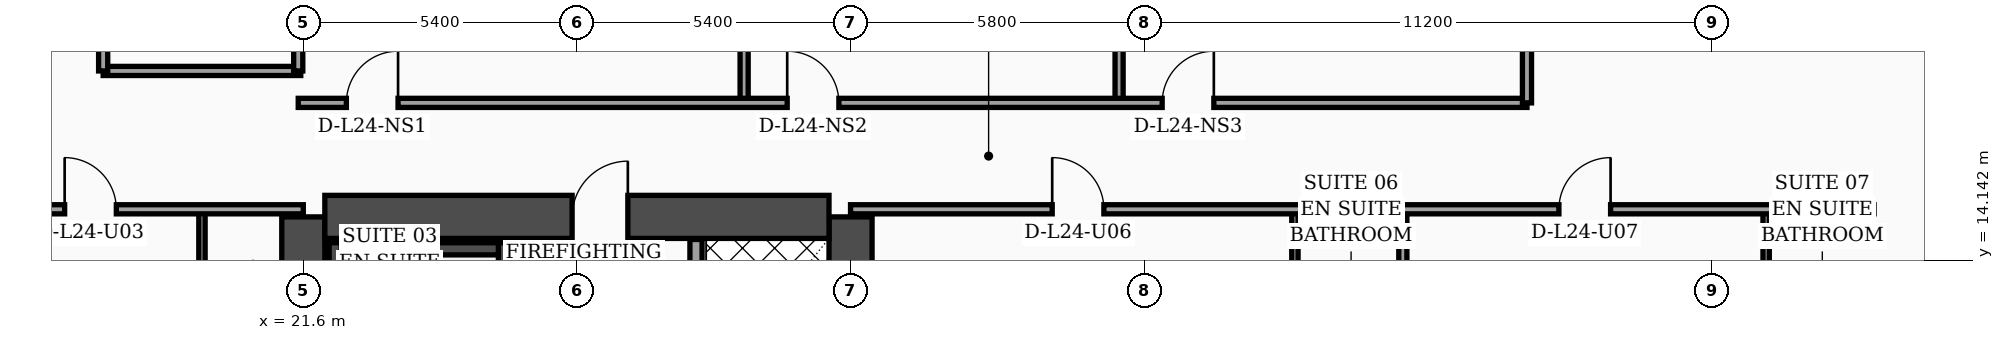
"""IFC4 building model, lengths in metres.
Left out: names, types, materials, properties, quantities, classifications, styles, units other than length and angle.
Written with IfcOpenShell. Run it as: python <this file> out.ifc"""

import sys

from ifc_helpers import new_model, si_unit, direction, frame, frame_2d, origin, place, context, subcontext, project, spatial, rectangle, extrude, element, fill, save


model = new_model("IFC4")
c1 = context("Model", 3, precision=1e-05, world=origin(), true_north=direction((0.0, 1.0)))
c2 = subcontext(c1, "Body", "Model", "MODEL_VIEW")
j1 = project(units=[si_unit("LENGTHUNIT", "METRE"), si_unit("PLANEANGLEUNIT", "RADIAN")], contexts=[c1])
p1 = place(None, origin())
s1 = spatial("IfcSite", under=j1, at=p1, CompositionType="ELEMENT")
p2 = place(p1, origin())
s2 = spatial("IfcBuilding", under=s1, at=p2, CompositionType="ELEMENT")
p3 = place(p2, frame((0.0, 0.0, 101.2)))
s3 = spatial("IfcBuildingStorey", under=s2, at=p3, CompositionType="ELEMENT", Elevation=101.2)
for number, where, z_axis, x_axis in (
    (1, (21.6, 4.6, 0.0), (0.0, 0.0, 1.0), (0.0, 1.0, 0.0)),
    (2, (32.4, 4.6, 0.0), (0.0, 0.0, 1.0), (0.0, 1.0, 0.0)),
):
    element("IfcWall", number, at=place(p3, frame(where, z_axis=z_axis, x_axis=x_axis)), inside=s3, PredefinedType="SHEAR", context=c2, shape_type="SweptSolid", body=[
        extrude(rectangle(XDim=10.4, YDim=0.85, at=frame_2d((5.2, 0.0))), origin(), (0.0, 0.0, 1.0), 3.56),
    ])
p4 = place(p3, frame((22.025, 15.0, 0.0), z_axis=(0.0, 0.0, 1.0), x_axis=(1.0, 0.0, 0.0)))
e3 = element("IfcWall", 3, at=p4, inside=s3, PredefinedType="SHEAR", context=c2, shape_type="SweptSolid", body=[
    extrude(rectangle(XDim=9.95, YDim=0.85, at=frame_2d((4.975, 0.0))), origin(), (0.0, 0.0, 1.0), 3.56),
])
p5 = place(p4, frame((4.88, 0.0, 0.0)))
e4 = element("IfcOpeningElement", 4, at=p5, cuts=e3, PredefinedType="OPENING", context=c2, shape_type="SweptSolid", body=[
    extrude(rectangle(XDim=1.1, YDim=2.2, at=frame_2d((0.55, 1.1))), frame((0.0, 0.435, 0.0), z_axis=(0.0, -1.0, 0.0), x_axis=(1.0, 0.0, 0.0)), (0.0, 0.0, 1.0), 0.87),
])
p6 = place(p3, frame((22.23, 5.025, 0.0), z_axis=(0.0, 0.0, 1.0), x_axis=(0.0, 1.0, 0.0)))
e5 = element("IfcWall", 5, at=p6, inside=s3, PredefinedType="SOLIDWALL", context=c2, shape_type="SweptSolid", body=[
    extrude(rectangle(XDim=9.465, YDim=0.24, at=frame_2d((4.732, 0.0))), origin(), (0.0, 0.0, 1.0), 3.56),
])
p7 = place(p3, frame((25.57, 5.025, 0.0), z_axis=(0.0, 0.0, 1.0), x_axis=(0.0, 1.0, 0.0)))
e6 = element("IfcWall", 6, at=p7, inside=s3, PredefinedType="SOLIDWALL", context=c2, shape_type="SweptSolid", body=[
    extrude(rectangle(XDim=9.465, YDim=0.24, at=frame_2d((4.732, 0.0))), origin(), (0.0, 0.0, 1.0), 3.56),
])
p8 = place(p7, frame((0.35, 0.0, 0.0)))
e7 = element("IfcOpeningElement", 7, at=p8, cuts=e6, PredefinedType="OPENING", context=c2, shape_type="SweptSolid", body=[
    extrude(rectangle(XDim=1.15, YDim=2.2, at=frame_2d((0.575, 1.1))), frame((0.0, 0.13, 0.0), z_axis=(0.0, -1.0, 0.0), x_axis=(1.0, 0.0, 0.0)), (0.0, 0.0, 1.0), 0.26),
])
p9 = place(p3, frame((22.35, 14.37, 0.0), z_axis=(0.0, 0.0, 1.0), x_axis=(1.0, 0.0, 0.0)))
e8 = element("IfcWall", 8, at=p9, inside=s3, PredefinedType="SOLIDWALL", context=c2, shape_type="SweptSolid", body=[
    extrude(rectangle(XDim=3.1, YDim=0.24, at=frame_2d((1.55, 0.0))), origin(), (0.0, 0.0, 1.0), 3.56),
])
p10 = place(p3, frame((59.23, 5.505, 0.0), z_axis=(0.0, 0.0, 1.0), x_axis=(-0.300509063924, 0.953778958931, 0.0)))
e9 = element("IfcWall", 9, at=p10, inside=s3, PredefinedType="SOLIDWALL", context=c2, shape_type="SweptSolid", body=[
    extrude(rectangle(XDim=30.814, YDim=0.32, at=frame_2d((15.407, 0.0))), origin(), (0.0, 0.0, 1.0), 3.56),
])
p11 = place(p10, frame((4.747, 0.0, 0.0)))
e10 = element("IfcOpeningElement", 10, at=p11, cuts=e9, PredefinedType="OPENING", context=c2, shape_type="SweptSolid", body=[
    extrude(rectangle(XDim=1.4, YDim=2.25, at=frame_2d((0.7, 1.125))), frame((0.0, 0.17, 0.0), z_axis=(0.0, -1.0, 0.0), x_axis=(1.0, 0.0, 0.0)), (0.0, 0.0, 1.0), 0.34),
])
p12 = place(p10, frame((1.6, 0.0, 0.75)))
e11 = element("IfcOpeningElement", 11, at=p12, cuts=e9, PredefinedType="OPENING", context=c2, shape_type="SweptSolid", body=[
    extrude(rectangle(XDim=1.5, YDim=1.6, at=frame_2d((0.75, 0.8))), frame((0.0, 0.17, 0.0), z_axis=(0.0, -1.0, 0.0), x_axis=(1.0, 0.0, 0.0)), (0.0, 0.0, 1.0), 0.34),
])
p13 = place(p10, frame((7.8, 0.0, 0.75)))
e12 = element("IfcOpeningElement", 12, at=p13, cuts=e9, PredefinedType="OPENING", context=c2, shape_type="SweptSolid", body=[
    extrude(rectangle(XDim=1.5, YDim=1.6, at=frame_2d((0.75, 0.8))), frame((0.0, 0.17, 0.0), z_axis=(0.0, -1.0, 0.0), x_axis=(1.0, 0.0, 0.0)), (0.0, 0.0, 1.0), 0.34),
])
p14 = place(p10, frame((10.9, 0.0, 0.75)))
e13 = element("IfcOpeningElement", 13, at=p14, cuts=e9, PredefinedType="OPENING", context=c2, shape_type="SweptSolid", body=[
    extrude(rectangle(XDim=1.5, YDim=1.6, at=frame_2d((0.75, 0.8))), frame((0.0, 0.17, 0.0), z_axis=(0.0, -1.0, 0.0), x_axis=(1.0, 0.0, 0.0)), (0.0, 0.0, 1.0), 0.34),
])
p15 = place(p10, frame((14.0, 0.0, 0.75)))
e14 = element("IfcOpeningElement", 14, at=p15, cuts=e9, PredefinedType="OPENING", context=c2, shape_type="SweptSolid", body=[
    extrude(rectangle(XDim=1.5, YDim=1.6, at=frame_2d((0.75, 0.8))), frame((0.0, 0.17, 0.0), z_axis=(0.0, -1.0, 0.0), x_axis=(1.0, 0.0, 0.0)), (0.0, 0.0, 1.0), 0.34),
])
p16 = place(p10, frame((17.1, 0.0, 0.75)))
e15 = element("IfcOpeningElement", 15, at=p16, cuts=e9, PredefinedType="OPENING", context=c2, shape_type="SweptSolid", body=[
    extrude(rectangle(XDim=1.5, YDim=1.6, at=frame_2d((0.75, 0.8))), frame((0.0, 0.17, 0.0), z_axis=(0.0, -1.0, 0.0), x_axis=(1.0, 0.0, 0.0)), (0.0, 0.0, 1.0), 0.34),
])
p17 = place(p10, frame((20.2, 0.0, 0.75)))
e16 = element("IfcOpeningElement", 16, at=p17, cuts=e9, PredefinedType="OPENING", context=c2, shape_type="SweptSolid", body=[
    extrude(rectangle(XDim=1.5, YDim=1.6, at=frame_2d((0.75, 0.8))), frame((0.0, 0.17, 0.0), z_axis=(0.0, -1.0, 0.0), x_axis=(1.0, 0.0, 0.0)), (0.0, 0.0, 1.0), 0.34),
])
p18 = place(p10, frame((23.3, 0.0, 0.75)))
e17 = element("IfcOpeningElement", 17, at=p18, cuts=e9, PredefinedType="OPENING", context=c2, shape_type="SweptSolid", body=[
    extrude(rectangle(XDim=1.5, YDim=1.6, at=frame_2d((0.75, 0.8))), frame((0.0, 0.17, 0.0), z_axis=(0.0, -1.0, 0.0), x_axis=(1.0, 0.0, 0.0)), (0.0, 0.0, 1.0), 0.34),
])
p19 = place(p10, frame((26.4, 0.0, 0.75)))
e18 = element("IfcOpeningElement", 18, at=p19, cuts=e9, PredefinedType="OPENING", context=c2, shape_type="SweptSolid", body=[
    extrude(rectangle(XDim=1.5, YDim=1.6, at=frame_2d((0.75, 0.8))), frame((0.0, 0.17, 0.0), z_axis=(0.0, -1.0, 0.0), x_axis=(1.0, 0.0, 0.0)), (0.0, 0.0, 1.0), 0.34),
])
p20 = place(p3, frame((29.35, 5.045, 0.0), z_axis=(0.0, 0.0, 1.0), x_axis=(0.0, 1.0, 0.0)))
e19 = element("IfcWall", 19, at=p20, inside=s3, PredefinedType="SOLIDWALL", context=c2, shape_type="SweptSolid", body=[
    extrude(rectangle(XDim=9.51, YDim=0.24, at=frame_2d((4.755, 0.0))), origin(), (0.0, 0.0, 1.0), 3.56),
])
p21 = place(p20, frame((0.55, 0.0, 0.0)))
e20 = element("IfcOpeningElement", 20, at=p21, cuts=e19, PredefinedType="OPENING", context=c2, shape_type="SweptSolid", body=[
    extrude(rectangle(XDim=1.3, YDim=2.35, at=frame_2d((0.65, 1.175))), frame((0.0, 0.13, 0.0), z_axis=(0.0, -1.0, 0.0), x_axis=(1.0, 0.0, 0.0)), (0.0, 0.0, 1.0), 0.26),
])
p22 = place(p3, frame((19.6, 2.44, 0.0), z_axis=(0.0, 0.0, 1.0), x_axis=(0.0, 1.0, 0.0)))
e21 = element("IfcWall", 21, at=p22, inside=s3, PredefinedType="PARTITIONING", context=c2, shape_type="SweptSolid", body=[
    extrude(rectangle(XDim=12.71, YDim=0.125, at=frame_2d((6.355, 0.0))), origin(), (0.0, 0.0, 1.0), 2.49),
])
p23 = place(p22, frame((4.34, 0.0, 0.0)))
e22 = element("IfcOpeningElement", 22, at=p23, cuts=e21, PredefinedType="OPENING", context=c2, shape_type="SweptSolid", body=[
    extrude(rectangle(XDim=0.96, YDim=2.2, at=frame_2d((0.48, 1.1))), frame((0.0, 0.073, 0.0), z_axis=(0.0, -1.0, 0.0), x_axis=(1.0, 0.0, 0.0)), (0.0, 0.0, 1.0), 0.145),
])
p24 = place(p22, frame((10.18, 0.0, 0.0)))
e23 = element("IfcOpeningElement", 23, at=p24, cuts=e21, PredefinedType="OPENING", context=c2, shape_type="SweptSolid", body=[
    extrude(rectangle(XDim=0.9, YDim=2.15, at=frame_2d((0.45, 1.075))), frame((0.0, 0.073, 0.0), z_axis=(0.0, -1.0, 0.0), x_axis=(1.0, 0.0, 0.0)), (0.0, 0.0, 1.0), 0.145),
])
p25 = place(p3, frame((15.15, 15.15, 0.0), z_axis=(0.0, 0.0, 1.0), x_axis=(1.0, 0.0, 0.0)))
e24 = element("IfcWall", 24, at=p25, inside=s3, PredefinedType="PARTITIONING", context=c2, shape_type="SweptSolid", body=[
    extrude(rectangle(XDim=6.45, YDim=0.18, at=frame_2d((3.225, 0.0))), origin(), (0.0, 0.0, 1.0), 2.49),
])
p26 = place(p25, frame((1.74, 0.0, 0.0)))
e25 = element("IfcOpeningElement", 25, at=p26, cuts=e24, PredefinedType="OPENING", context=c2, shape_type="SweptSolid", body=[
    extrude(rectangle(XDim=1.02, YDim=2.2, at=frame_2d((0.51, 1.1))), frame((0.0, 0.1, 0.0), z_axis=(0.0, -1.0, 0.0), x_axis=(1.0, 0.0, 0.0)), (0.0, 0.0, 1.0), 0.2),
])
p27 = place(p3, frame((17.65, 17.88, 0.0), z_axis=(0.0, 0.0, 1.0), x_axis=(1.0, 0.0, 0.0)))
e26 = element("IfcWall", 26, at=p27, inside=s3, PredefinedType="PARTITIONING", context=c2, shape_type="SweptSolid", body=[
    extrude(rectangle(XDim=3.9, YDim=0.18, at=frame_2d((1.95, 0.0))), origin(), (0.0, 0.0, 1.0), 3.09),
])
p28 = place(p3, frame((21.5, 17.88, 0.0), z_axis=(0.0, 0.0, 1.0), x_axis=(0.0, 1.0, 0.0)))
e27 = element("IfcWall", 27, at=p28, inside=s3, PredefinedType="PARTITIONING", context=c2, shape_type="SweptSolid", body=[
    extrude(rectangle(XDim=6.44, YDim=0.18, at=frame_2d((3.22, 0.0))), origin(), (0.0, 0.0, 1.0), 3.09),
])
p29 = place(p3, frame((17.65, 17.88, 0.0), z_axis=(0.0, 0.0, 1.0), x_axis=(0.0, 1.0, 0.0)))
e28 = element("IfcWall", 28, at=p29, inside=s3, PredefinedType="PARTITIONING", context=c2, shape_type="SweptSolid", body=[
    extrude(rectangle(XDim=6.44, YDim=0.18, at=frame_2d((3.22, 0.0))), origin(), (0.0, 0.0, 1.0), 3.09),
])
p30 = place(p29, frame((0.65, 0.0, 0.0)))
e29 = element("IfcOpeningElement", 29, at=p30, cuts=e28, PredefinedType="OPENING", context=c2, shape_type="SweptSolid", body=[
    extrude(rectangle(XDim=0.98, YDim=2.15, at=frame_2d((0.49, 1.075))), frame((0.0, 0.1, 0.0), z_axis=(0.0, -1.0, 0.0), x_axis=(1.0, 0.0, 0.0)), (0.0, 0.0, 1.0), 0.2),
])
p31 = place(p29, frame((3.97, 0.0, 0.0)))
e30 = element("IfcOpeningElement", 30, at=p31, cuts=e28, PredefinedType="OPENING", context=c2, shape_type="SweptSolid", body=[
    extrude(rectangle(XDim=0.96, YDim=2.2, at=frame_2d((0.48, 1.1))), frame((0.0, 0.1, 0.0), z_axis=(0.0, -1.0, 0.0), x_axis=(1.0, 0.0, 0.0)), (0.0, 0.0, 1.0), 0.2),
])
p32 = place(p3, frame((41.17, 2.44, 0.0), z_axis=(0.0, 0.0, 1.0), x_axis=(0.0, 1.0, 0.0)))
e31 = element("IfcWall", 31, at=p32, inside=s3, PredefinedType="PARTITIONING", context=c2, shape_type="SweptSolid", body=[
    extrude(rectangle(XDim=12.71, YDim=0.125, at=frame_2d((6.355, 0.0))), origin(), (0.0, 0.0, 1.0), 3.04),
])
p33 = place(p32, frame((4.35, 0.0, 0.0)))
e32 = element("IfcOpeningElement", 32, at=p33, cuts=e31, PredefinedType="OPENING", context=c2, shape_type="SweptSolid", body=[
    extrude(rectangle(XDim=0.96, YDim=2.2, at=frame_2d((0.48, 1.1))), frame((0.0, 0.073, 0.0), z_axis=(0.0, -1.0, 0.0), x_axis=(1.0, 0.0, 0.0)), (0.0, 0.0, 1.0), 0.145),
])
p34 = place(p32, frame((10.21, 0.0, 0.0)))
e33 = element("IfcOpeningElement", 33, at=p34, cuts=e31, PredefinedType="OPENING", context=c2, shape_type="SweptSolid", body=[
    extrude(rectangle(XDim=0.9, YDim=2.15, at=frame_2d((0.45, 1.075))), frame((0.0, 0.073, 0.0), z_axis=(0.0, -1.0, 0.0), x_axis=(1.0, 0.0, 0.0)), (0.0, 0.0, 1.0), 0.145),
])
p35 = place(p3, frame((50.47, 2.44, 0.0), z_axis=(0.0, 0.0, 1.0), x_axis=(0.0, 1.0, 0.0)))
e34 = element("IfcWall", 34, at=p35, inside=s3, PredefinedType="PARTITIONING", context=c2, shape_type="SweptSolid", body=[
    extrude(rectangle(XDim=12.71, YDim=0.125, at=frame_2d((6.355, 0.0))), origin(), (0.0, 0.0, 1.0), 3.04),
])
p36 = place(p35, frame((4.35, 0.0, 0.0)))
e35 = element("IfcOpeningElement", 35, at=p36, cuts=e34, PredefinedType="OPENING", context=c2, shape_type="SweptSolid", body=[
    extrude(rectangle(XDim=0.96, YDim=2.2, at=frame_2d((0.48, 1.1))), frame((0.0, 0.073, 0.0), z_axis=(0.0, -1.0, 0.0), x_axis=(1.0, 0.0, 0.0)), (0.0, 0.0, 1.0), 0.145),
])
p37 = place(p35, frame((10.21, 0.0, 0.0)))
e36 = element("IfcOpeningElement", 36, at=p37, cuts=e34, PredefinedType="OPENING", context=c2, shape_type="SweptSolid", body=[
    extrude(rectangle(XDim=0.9, YDim=2.15, at=frame_2d((0.45, 1.075))), frame((0.0, 0.073, 0.0), z_axis=(0.0, -1.0, 0.0), x_axis=(1.0, 0.0, 0.0)), (0.0, 0.0, 1.0), 0.145),
])
p38 = place(p3, frame((43.3, 2.44, 0.0), z_axis=(0.0, 0.0, 1.0), x_axis=(0.0, 1.0, 0.0)))
e37 = element("IfcWall", 37, at=p38, inside=s3, PredefinedType="PARTITIONING", context=c2, shape_type="SweptSolid", body=[
    extrude(rectangle(XDim=12.71, YDim=0.16, at=frame_2d((6.355, 0.0))), origin(), (0.0, 0.0, 1.0), 3.04),
])
p39 = place(p3, frame((32.4, 15.15, 0.0), z_axis=(0.0, 0.0, 1.0), x_axis=(1.0, 0.0, 0.0)))
e38 = element("IfcWall", 38, at=p39, inside=s3, PredefinedType="PARTITIONING", context=c2, shape_type="SweptSolid", body=[
    extrude(rectangle(XDim=20.2, YDim=0.18, at=frame_2d((10.1, 0.0))), origin(), (0.0, 0.0, 1.0), 2.84),
])
p40 = place(p39, frame((3.98, 0.0, 0.0)))
e39 = element("IfcOpeningElement", 39, at=p40, cuts=e38, PredefinedType="OPENING", context=c2, shape_type="SweptSolid", body=[
    extrude(rectangle(XDim=1.02, YDim=2.2, at=frame_2d((0.51, 1.1))), frame((0.0, 0.1, 0.0), z_axis=(0.0, -1.0, 0.0), x_axis=(1.0, 0.0, 0.0)), (0.0, 0.0, 1.0), 0.2),
])
p41 = place(p39, frame((13.98, 0.0, 0.0)))
e40 = element("IfcOpeningElement", 40, at=p41, cuts=e38, PredefinedType="OPENING", context=c2, shape_type="SweptSolid", body=[
    extrude(rectangle(XDim=1.02, YDim=2.2, at=frame_2d((0.51, 1.1))), frame((0.0, 0.1, 0.0), z_axis=(0.0, -1.0, 0.0), x_axis=(1.0, 0.0, 0.0)), (0.0, 0.0, 1.0), 0.2),
])
p42 = place(p3, frame((30.3, 17.25, 0.0), z_axis=(0.0, 0.0, 1.0), x_axis=(0.0, 1.0, 0.0)))
e41 = element("IfcWall", 41, at=p42, inside=s3, PredefinedType="PARTITIONING", context=c2, shape_type="SweptSolid", body=[
    extrude(rectangle(XDim=12.08, YDim=0.16, at=frame_2d((6.04, 0.0))), origin(), (0.0, 0.0, 1.0), 2.84),
])
p43 = place(p3, frame((37.7, 17.25, 0.0), z_axis=(0.0, 0.0, 1.0), x_axis=(0.0, 1.0, 0.0)))
e42 = element("IfcWall", 42, at=p43, inside=s3, PredefinedType="PARTITIONING", context=c2, shape_type="SweptSolid", body=[
    extrude(rectangle(XDim=16.2, YDim=0.16, at=frame_2d((8.1, 0.0))), origin(), (0.0, 0.0, 1.0), 2.84),
])
p44 = place(p3, frame((21.5, 17.25, 0.0), z_axis=(0.0, 0.0, 1.0), x_axis=(1.0, 0.0, 0.0)))
e43 = element("IfcWall", 43, at=p44, inside=s3, PredefinedType="PARTITIONING", context=c2, shape_type="SweptSolid", body=[
    extrude(rectangle(XDim=24.25, YDim=0.18, at=frame_2d((12.125, 0.0))), origin(), (0.0, 0.0, 1.0), 2.84),
])
p45 = place(p44, frame((0.95, 0.0, 0.0)))
e44 = element("IfcOpeningElement", 44, at=p45, cuts=e43, PredefinedType="OPENING", context=c2, shape_type="SweptSolid", body=[
    extrude(rectangle(XDim=1.02, YDim=2.2, at=frame_2d((0.51, 1.1))), frame((0.0, 0.1, 0.0), z_axis=(0.0, -1.0, 0.0), x_axis=(1.0, 0.0, 0.0)), (0.0, 0.0, 1.0), 0.2),
])
p46 = place(p44, frame((9.65, 0.0, 0.0)))
e45 = element("IfcOpeningElement", 45, at=p46, cuts=e43, PredefinedType="OPENING", context=c2, shape_type="SweptSolid", body=[
    extrude(rectangle(XDim=1.02, YDim=2.2, at=frame_2d((0.51, 1.1))), frame((0.0, 0.1, 0.0), z_axis=(0.0, -1.0, 0.0), x_axis=(1.0, 0.0, 0.0)), (0.0, 0.0, 1.0), 0.2),
])
p47 = place(p44, frame((17.05, 0.0, 0.0)))
e46 = element("IfcOpeningElement", 46, at=p47, cuts=e43, PredefinedType="OPENING", context=c2, shape_type="SweptSolid", body=[
    extrude(rectangle(XDim=1.02, YDim=2.2, at=frame_2d((0.51, 1.1))), frame((0.0, 0.1, 0.0), z_axis=(0.0, -1.0, 0.0), x_axis=(1.0, 0.0, 0.0)), (0.0, 0.0, 1.0), 0.2),
])
p48 = place(p3, frame((45.75, 17.25, 0.0), z_axis=(0.0, 0.0, 1.0), x_axis=(0.0, 1.0, 0.0)))
e47 = element("IfcWall", 47, at=p48, inside=s3, PredefinedType="PARTITIONING", context=c2, shape_type="SweptSolid", body=[
    extrude(rectangle(XDim=20.69, YDim=0.18, at=frame_2d((10.345, 0.0))), origin(), (0.0, 0.0, 1.0), 2.84),
])
p49 = place(p26, origin())
e48 = element("IfcDoor", 48, at=p49, inside=s3, OperationType="SINGLE_SWING_LEFT", PredefinedType="DOOR", context=c2, shape_type="SweptSolid", body=[
    extrude(rectangle(XDim=1.02, YDim=2.2, at=frame_2d((0.51, 1.1))), frame((0.0, 0.025, 0.0), z_axis=(0.0, -1.0, 0.0), x_axis=(1.0, 0.0, 0.0)), (0.0, 0.0, 1.0), 0.05),
])
fill(e25, e48)
p50 = place(p40, origin())
e49 = element("IfcDoor", 49, at=p50, inside=s3, OperationType="SINGLE_SWING_LEFT", PredefinedType="DOOR", context=c2, shape_type="SweptSolid", body=[
    extrude(rectangle(XDim=1.02, YDim=2.2, at=frame_2d((0.51, 1.1))), frame((0.0, 0.025, 0.0), z_axis=(0.0, -1.0, 0.0), x_axis=(1.0, 0.0, 0.0)), (0.0, 0.0, 1.0), 0.05),
])
fill(e39, e49)
p51 = place(p41, origin())
e50 = element("IfcDoor", 50, at=p51, inside=s3, OperationType="SINGLE_SWING_RIGHT", PredefinedType="DOOR", context=c2, shape_type="SweptSolid", body=[
    extrude(rectangle(XDim=1.02, YDim=2.2, at=frame_2d((0.51, 1.1))), frame((0.0, 0.025, 0.0), z_axis=(0.0, -1.0, 0.0), x_axis=(1.0, 0.0, 0.0)), (0.0, 0.0, 1.0), 0.05),
])
fill(e40, e50)
p52 = place(p45, origin())
e51 = element("IfcDoor", 51, at=p52, inside=s3, OperationType="SINGLE_SWING_RIGHT", PredefinedType="DOOR", context=c2, shape_type="SweptSolid", body=[
    extrude(rectangle(XDim=1.02, YDim=2.2, at=frame_2d((0.51, 1.1))), frame((0.0, 0.025, 0.0), z_axis=(0.0, -1.0, 0.0), x_axis=(1.0, 0.0, 0.0)), (0.0, 0.0, 1.0), 0.05),
])
fill(e44, e51)
p53 = place(p46, origin())
e52 = element("IfcDoor", 52, at=p53, inside=s3, OperationType="SINGLE_SWING_LEFT", PredefinedType="DOOR", context=c2, shape_type="SweptSolid", body=[
    extrude(rectangle(XDim=1.02, YDim=2.2, at=frame_2d((0.51, 1.1))), frame((0.0, 0.025, 0.0), z_axis=(0.0, -1.0, 0.0), x_axis=(1.0, 0.0, 0.0)), (0.0, 0.0, 1.0), 0.05),
])
fill(e45, e52)
p54 = place(p47, origin())
e53 = element("IfcDoor", 53, at=p54, inside=s3, OperationType="SINGLE_SWING_RIGHT", PredefinedType="DOOR", context=c2, shape_type="SweptSolid", body=[
    extrude(rectangle(XDim=1.02, YDim=2.2, at=frame_2d((0.51, 1.1))), frame((0.0, 0.025, 0.0), z_axis=(0.0, -1.0, 0.0), x_axis=(1.0, 0.0, 0.0)), (0.0, 0.0, 1.0), 0.05),
])
fill(e46, e53)
p55 = place(p5, origin())
e54 = element("IfcDoor", 54, at=p55, inside=s3, OperationType="SINGLE_SWING_RIGHT", PredefinedType="DOOR", context=c2, shape_type="SweptSolid", body=[
    extrude(rectangle(XDim=1.1, YDim=2.2, at=frame_2d((0.55, 1.1))), frame((0.0, 0.025, 0.0), z_axis=(0.0, -1.0, 0.0), x_axis=(1.0, 0.0, 0.0)), (0.0, 0.0, 1.0), 0.05),
])
fill(e4, e54)
save(model, sys.argv[1])
